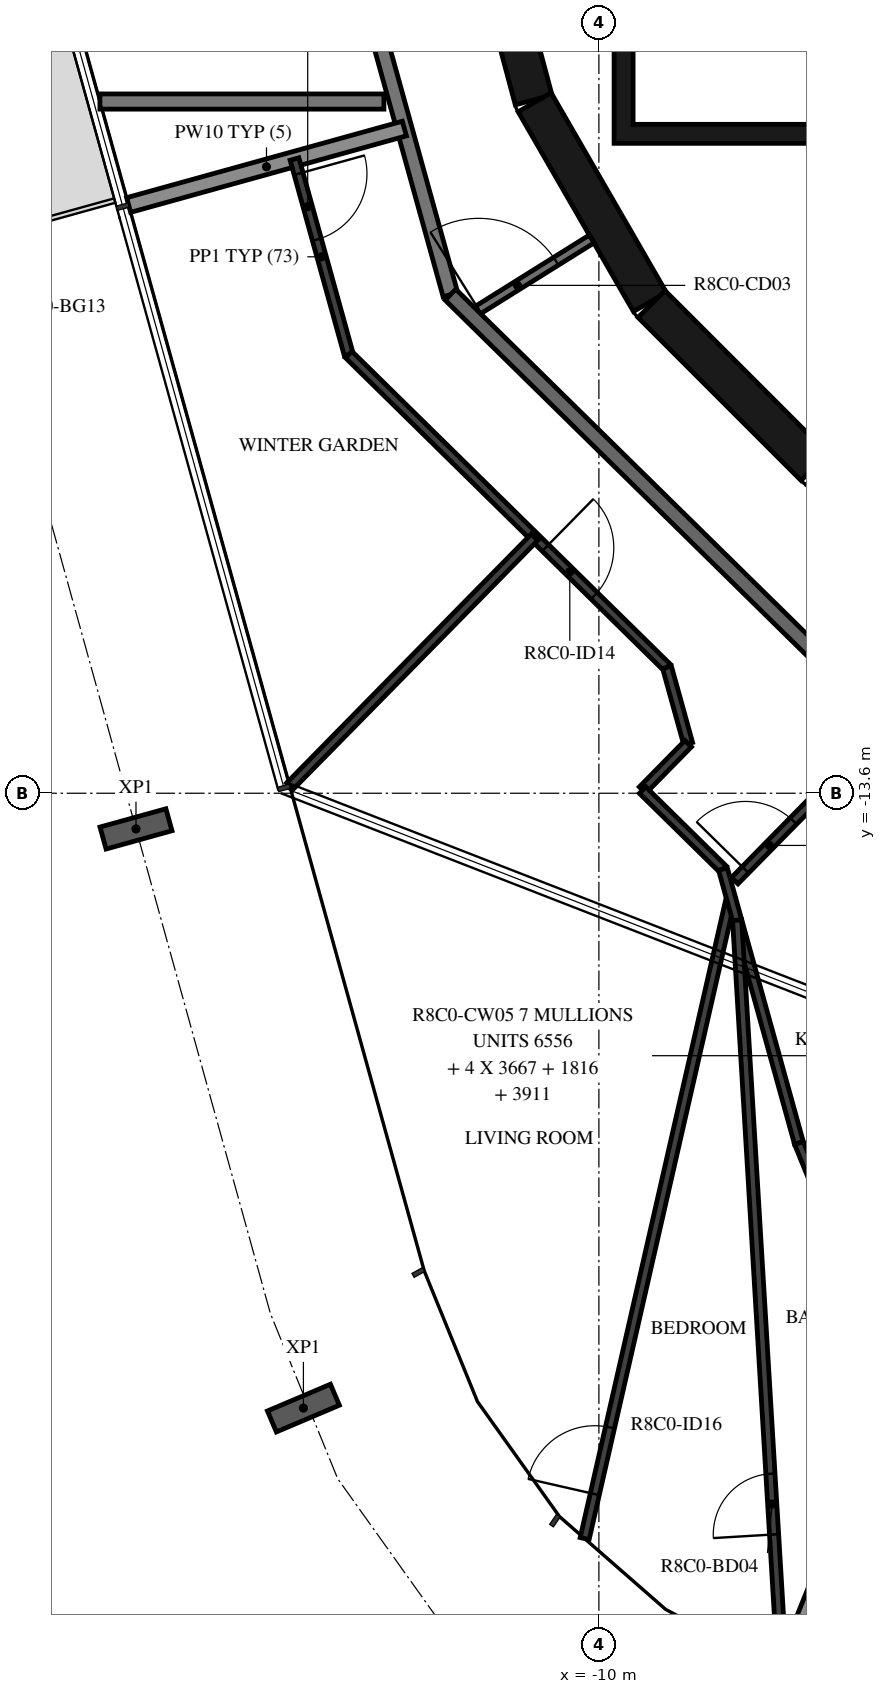
"""IFC4 building model, lengths in metres.
Left out: names, types, materials, properties, quantities, classifications, styles, units other than length and angle.
Written with IfcOpenShell. Run it as: python <this file> out.ifc"""

import sys

from ifc_helpers import new_model, si_unit, direction, frame, frame_2d, origin, origin_2d, place, context, subcontext, project, spatial, polyline, rectangle, i_section, outline, extrude, element, fill, save


model = new_model("IFC4")
c1 = context("Model", 3, precision=1e-05, world=origin(), true_north=direction((0.0, 1.0)))
c2 = subcontext(c1, "Body", "Model", "MODEL_VIEW")
j1 = project(units=[si_unit("LENGTHUNIT", "METRE"), si_unit("PLANEANGLEUNIT", "RADIAN")], contexts=[c1])
p1 = place(None, origin())
s1 = spatial("IfcSite", under=j1, at=p1, CompositionType="ELEMENT")
p2 = place(p1, origin())
s2 = spatial("IfcBuilding", under=s1, at=p2, CompositionType="ELEMENT")
p3 = place(p2, frame((0.0, 0.0, 319.2)))
s3 = spatial("IfcBuildingStorey", under=s2, at=p3, CompositionType="ELEMENT", Elevation=319.2)
for number, where, z_axis, x_axis in (
    (1, (-16.09, -14.069, -0.38), (0.0, 0.0, 1.0), (-0.267, 0.964, 0.0)),
    (2, (-13.887, -21.689, -0.38), (0.0, 0.0, 1.0), (-0.39, 0.921, 0.0)),
):
    element("IfcColumn", number, at=place(p3, frame(where, z_axis=z_axis, x_axis=x_axis)), inside=s3, PredefinedType="COLUMN", context=c2, shape_type="SweptSolid", body=[
        extrude(i_section(OverallWidth=0.3, OverallDepth=0.9, WebThickness=0.019, FlangeThickness=0.035, FilletRadius=0.03, at=origin_2d()), origin(), (0.0, 0.0, 1.0), 3.5),
    ])
p4 = place(p3, frame((-11.643, -1.55, 0.0), z_axis=(0.0, 0.0, 1.0), x_axis=(0.258734743916, -0.965948410781, 0.0)))
e3 = element("IfcWall", 3, at=p4, inside=s3, PredefinedType="SHEAR", context=c2, shape_type="SweptSolid", body=[
    extrude(rectangle(XDim=3.033, YDim=0.5, at=frame_2d((1.516, 0.0))), origin(), (0.0, 0.0, 1.0), 3.12),
])
p5 = place(p4, frame((1.066, 0.0, 0.0)))
e4 = element("IfcOpeningElement", 4, at=p5, cuts=e3, PredefinedType="OPENING", context=c2, shape_type="SweptSolid", body=[
    extrude(rectangle(XDim=0.9, YDim=2.1, at=frame_2d((0.45, 1.05))), frame((0.0, 0.26, 0.0), z_axis=(0.0, -1.0, 0.0), x_axis=(1.0, 0.0, 0.0)), (0.0, 0.0, 1.0), 0.52),
])
p6 = place(p3, frame((-10.845, -4.51, 0.0), z_axis=(0.0, 0.0, 1.0), x_axis=(0.500087131594, -0.865975092491, 0.0)))
e5 = element("IfcWall", 5, at=p6, inside=s3, PredefinedType="SHEAR", context=c2, shape_type="SweptSolid", body=[
    extrude(rectangle(XDim=3.033, YDim=0.5, at=frame_2d((1.516, 0.0))), origin(), (0.0, 0.0, 1.0), 3.12),
])
p7 = place(p3, frame((-9.308, -7.164, 0.0), z_axis=(0.0, 0.0, 1.0), x_axis=(0.707106781187, -0.707106781187, 0.0)))
e6 = element("IfcWall", 6, at=p7, inside=s3, PredefinedType="SHEAR", context=c2, shape_type="SweptSolid", body=[
    extrude(rectangle(XDim=3.032, YDim=0.5, at=frame_2d((1.516, 0.0))), origin(), (0.0, 0.0, 1.0), 3.12),
])
p8 = place(p3, origin())
e7 = element("IfcWall", 7, at=p8, inside=s3, PredefinedType="SHEAR", context=c2, shape_type="SweptSolid", body=[
    extrude(outline(polyline([(9.8, -5.05), (9.8, -4.8), (9.8, -1.9), (9.55, -1.9), (9.55, -4.8), (7.65, -4.8), (7.65, -1.9), (7.4, -1.9), (7.4, -4.8), (5.5, -4.8), (5.5, -1.9), (5.25, -1.9), (5.25, -4.8), (3.35, -4.8), (3.35, -1.9), (3.1, -1.9), (3.1, -4.8), (1.2, -4.8), (1.2, -1.9), (0.95, -1.9), (0.95, -4.8), (-0.95, -4.8), (-0.95, -1.9), (-1.2, -1.9), (-1.2, -4.8), (-3.1, -4.8), (-3.1, -1.9), (-3.35, -1.9), (-3.35, -4.8), (-5.25, -4.8), (-5.25, -1.9), (-5.5, -1.9), (-5.5, -4.8), (-9.55, -4.8), (-9.55, -1.9), (-9.8, -1.9), (-9.8, -4.8), (-9.8, -5.05), (9.8, -5.05)])), origin(), (0.0, 0.0, 1.0), 3.12),
])
p9 = place(p3, frame((-11.687, -7.303, 0.0), z_axis=(0.0, 0.0, 1.0), x_axis=(0.848064094072, 0.529893661357, 0.0)))
e8 = element("IfcWall", 8, at=p9, inside=s3, PredefinedType="PARTITIONING", context=c2, shape_type="SweptSolid", body=[
    extrude(rectangle(XDim=1.876, YDim=0.12, at=frame_2d((0.938, 0.0))), origin(), (0.0, 0.0, 1.0), 3.12),
])
p10 = place(p9, frame((0.125, 0.0, 0.0)))
e9 = element("IfcOpeningElement", 9, at=p10, cuts=e8, PredefinedType="OPENING", context=c2, shape_type="SweptSolid", body=[
    extrude(rectangle(XDim=1.2, YDim=2.1, at=frame_2d((0.6, 1.05))), frame((0.0, 0.07, 0.0), z_axis=(0.0, -1.0, 0.0), x_axis=(1.0, 0.0, 0.0)), (0.0, 0.0, 1.0), 0.14),
])
p11 = place(p3, frame((-13.872, -0.121, 0.0), z_axis=(0.0, 0.0, 1.0), x_axis=(0.267254575108, -0.963625960674, 0.0)))
e10 = element("IfcWall", 10, at=p11, inside=s3, PredefinedType="STANDARD", context=c2, shape_type="SweptSolid", body=[
    extrude(rectangle(XDim=7.181, YDim=0.2, at=frame_2d((3.591, 0.0))), origin(), (0.0, 0.0, 1.0), 3.12),
])
p12 = place(p3, frame((-11.953, -7.041, 0.0), z_axis=(0.0, 0.0, 1.0), x_axis=(0.713250549143, -0.70090916255, 0.0)))
e11 = element("IfcWall", 11, at=p12, inside=s3, PredefinedType="STANDARD", context=c2, shape_type="SweptSolid", body=[
    extrude(rectangle(XDim=7.181, YDim=0.2, at=frame_2d((3.59, 0.0))), origin(), (0.0, 0.0, 1.0), 3.12),
])
p13 = place(p3, frame((-16.564, -4.5, 0.0), z_axis=(0.0, 0.0, 1.0), x_axis=(1.0, 0.0, 0.0)))
e12 = element("IfcWall", 12, at=p13, inside=s3, PredefinedType="STANDARD", context=c2, shape_type="SweptSolid", body=[
    extrude(rectangle(XDim=3.736, YDim=0.2, at=frame_2d((1.868, 0.0))), origin(), (0.0, 0.0, 1.0), 3.12),
])
p14 = place(p3, frame((-16.187, -5.862, 0.0), z_axis=(0.0, 0.0, 1.0), x_axis=(0.963631166683, 0.267235803358, 0.0)))
e13 = element("IfcWall", 13, at=p14, inside=s3, PredefinedType="STANDARD", context=c2, shape_type="SweptSolid", body=[
    extrude(rectangle(XDim=3.765, YDim=0.2, at=frame_2d((1.882, 0.0))), origin(), (0.0, 0.0, 1.0), 2.73),
])
p15 = place(p3, frame((-7.582, -25.151, 0.0), z_axis=(0.0, 0.0, 1.0), x_axis=(0.374645287615, 0.927168220156, 0.0)))
e14 = element("IfcWall", 14, at=p15, inside=s3, PredefinedType="STANDARD", context=c2, shape_type="SweptSolid", body=[
    extrude(rectangle(XDim=6.423, YDim=0.2, at=frame_2d((3.212, 0.0))), origin(), (0.0, 0.0, 1.0), 2.73),
])
p16 = place(p3, frame((-14.005, -5.256, 0.0), z_axis=(0.0, 0.0, 1.0), x_axis=(0.267200500487, -0.963640956238, 0.0)))
e15 = element("IfcWall", 15, at=p16, inside=s3, PredefinedType="PARTITIONING", context=c2, shape_type="SweptSolid", body=[
    extrude(rectangle(XDim=2.67, YDim=0.12, at=frame_2d((1.335, 0.0))), origin(), (0.0, 0.0, 1.0), 3.12),
])
p17 = place(p16, frame((0.2, 0.0, 0.0)))
e16 = element("IfcOpeningElement", 16, at=p17, cuts=e15, PredefinedType="OPENING", context=c2, shape_type="SweptSolid", body=[
    extrude(rectangle(XDim=0.9, YDim=2.1, at=frame_2d((0.45, 1.05))), frame((0.0, 0.07, 0.0), z_axis=(0.0, -1.0, 0.0), x_axis=(1.0, 0.0, 0.0)), (0.0, 0.0, 1.0), 0.14),
])
p18 = place(p3, frame((-13.291, -7.829, 0.0), z_axis=(0.0, 0.0, 1.0), x_axis=(0.713255094589, -0.700904537039, 0.0)))
e17 = element("IfcWall", 17, at=p18, inside=s3, PredefinedType="PARTITIONING", context=c2, shape_type="SweptSolid", body=[
    extrude(rectangle(XDim=5.871, YDim=0.12, at=frame_2d((2.936, 0.0))), origin(), (0.0, 0.0, 1.0), 3.12),
])
p19 = place(p18, frame((3.627, 0.0, 0.0)))
e18 = element("IfcOpeningElement", 18, at=p19, cuts=e17, PredefinedType="OPENING", context=c2, shape_type="SweptSolid", body=[
    extrude(rectangle(XDim=0.9, YDim=2.1, at=frame_2d((0.45, 1.05))), frame((0.0, 0.07, 0.0), z_axis=(0.0, -1.0, 0.0), x_axis=(1.0, 0.0, 0.0)), (0.0, 0.0, 1.0), 0.14),
])
p20 = place(p3, frame((-9.104, -11.944, 0.0), z_axis=(0.0, 0.0, 1.0), x_axis=(0.267317596771, -0.963608479859, 0.0)))
e19 = element("IfcWall", 19, at=p20, inside=s3, PredefinedType="PARTITIONING", context=c2, shape_type="SweptSolid", body=[
    extrude(rectangle(XDim=1.042, YDim=0.12, at=frame_2d((0.521, 0.0))), origin(), (0.0, 0.0, 1.0), 3.12),
])
p21 = place(p3, frame((-8.825, -12.948, 0.0), z_axis=(0.0, 0.0, 1.0), x_axis=(-0.700949034431, -0.713211364976, 0.0)))
e20 = element("IfcWall", 20, at=p21, inside=s3, PredefinedType="PARTITIONING", context=c2, shape_type="SweptSolid", body=[
    extrude(rectangle(XDim=0.856, YDim=0.12, at=frame_2d((0.428, 0.0))), origin(), (0.0, 0.0, 1.0), 3.12),
])
p22 = place(p3, frame((-9.425, -13.559, 0.0), z_axis=(0.0, 0.0, 1.0), x_axis=(0.713255540994, -0.700904082768, 0.0)))
e21 = element("IfcWall", 21, at=p22, inside=s3, PredefinedType="PARTITIONING", context=c2, shape_type="SweptSolid", body=[
    extrude(rectangle(XDim=1.482, YDim=0.12, at=frame_2d((0.741, 0.0))), origin(), (0.0, 0.0, 1.0), 3.12),
])
p23 = place(p3, frame((-8.213, -14.75, 0.0), z_axis=(0.0, 0.0, 1.0), x_axis=(0.700899260151, 0.713260280066, 0.0)))
e22 = element("IfcWall", 22, at=p23, inside=s3, PredefinedType="PARTITIONING", context=c2, shape_type="SweptSolid", body=[
    extrude(rectangle(XDim=1.659, YDim=0.12, at=frame_2d((0.83, 0.0))), origin(), (0.0, 0.0, 1.0), 3.12),
])
p24 = place(p23, frame((0.2, 0.0, 0.0)))
e23 = element("IfcOpeningElement", 23, at=p24, cuts=e22, PredefinedType="OPENING", context=c2, shape_type="SweptSolid", body=[
    extrude(rectangle(XDim=0.9, YDim=2.1, at=frame_2d((0.45, 1.05))), frame((0.0, 0.07, 0.0), z_axis=(0.0, -1.0, 0.0), x_axis=(1.0, 0.0, 0.0)), (0.0, 0.0, 1.0), 0.14),
])
p25 = place(p3, frame((-14.066, -13.508, 0.0), z_axis=(0.0, 0.0, 1.0), x_axis=(0.700941781432, 0.7132184932, 0.0)))
e24 = element("IfcWall", 24, at=p25, inside=s3, PredefinedType="PARTITIONING", context=c2, shape_type="SweptSolid", body=[
    extrude(rectangle(XDim=4.594, YDim=0.12, at=frame_2d((2.297, 0.0))), origin(), (0.0, 0.0, 1.0), 3.12),
])
p26 = place(p3, frame((-10.187, -23.406, 0.0), z_axis=(0.0, 0.0, 1.0), x_axis=(0.222411648081, 0.974952849526, 0.0)))
e25 = element("IfcWall", 25, at=p26, inside=s3, PredefinedType="PARTITIONING", context=c2, shape_type="SweptSolid", body=[
    extrude(rectangle(XDim=8.649, YDim=0.12, at=frame_2d((4.324, 0.0))), origin(), (0.0, 0.0, 1.0), 3.12),
])
p27 = place(p26, frame((0.6, 0.0, 0.0)))
e26 = element("IfcOpeningElement", 26, at=p27, cuts=e25, PredefinedType="OPENING", context=c2, shape_type="SweptSolid", body=[
    extrude(rectangle(XDim=0.9, YDim=2.1, at=frame_2d((0.45, 1.05))), frame((0.0, 0.07, 0.0), z_axis=(0.0, -1.0, 0.0), x_axis=(1.0, 0.0, 0.0)), (0.0, 0.0, 1.0), 0.14),
])
p28 = place(p3, frame((-7.368, -18.202, 0.0), z_axis=(0.0, 0.0, 1.0), x_axis=(-0.267246564077, 0.963628182438, 0.0)))
e27 = element("IfcWall", 27, at=p28, inside=s3, PredefinedType="PARTITIONING", context=c2, shape_type="SweptSolid", body=[
    extrude(rectangle(XDim=3.74, YDim=0.12, at=frame_2d((1.87, 0.0))), origin(), (0.0, 0.0, 1.0), 3.12),
])
p29 = place(p3, frame((-7.587, -25.148, 0.0), z_axis=(0.0, 0.0, 1.0), x_axis=(-0.060023558623, 0.99819696073, 0.0)))
e28 = element("IfcWall", 28, at=p29, inside=s3, PredefinedType="PARTITIONING", context=c2, shape_type="SweptSolid", body=[
    extrude(rectangle(XDim=9.896, YDim=0.12, at=frame_2d((4.948, 0.0))), origin(), (0.0, 0.0, 1.0), 3.12),
])
p30 = place(p29, frame((1.8, 0.0, 0.0)))
e29 = element("IfcOpeningElement", 29, at=p30, cuts=e28, PredefinedType="OPENING", context=c2, shape_type="SweptSolid", body=[
    extrude(rectangle(XDim=0.8, YDim=2.1, at=frame_2d((0.4, 1.05))), frame((0.0, 0.07, 0.0), z_axis=(0.0, -1.0, 0.0), x_axis=(1.0, 0.0, 0.0)), (0.0, 0.0, 1.0), 0.14),
])
p31 = place(p3, frame((-7.368, -18.202, 0.0), z_axis=(0.0, 0.0, 1.0), x_axis=(0.377296887314, -0.92609235977, 0.0)))
e30 = element("IfcWall", 30, at=p31, inside=s3, PredefinedType="PARTITIONING", context=c2, shape_type="SweptSolid", body=[
    extrude(rectangle(XDim=0.947, YDim=0.12, at=frame_2d((0.473, 0.0))), origin(), (0.0, 0.0, 1.0), 3.12),
])
p32 = place(p17, origin())
e31 = element("IfcDoor", 31, at=p32, inside=s3, OperationType="SINGLE_SWING_RIGHT", PredefinedType="DOOR", context=c2, shape_type="SweptSolid", body=[
    extrude(rectangle(XDim=0.9, YDim=2.1, at=frame_2d((0.45, 1.05))), frame((0.0, 0.025, 0.0), z_axis=(0.0, -1.0, 0.0), x_axis=(1.0, 0.0, 0.0)), (0.0, 0.0, 1.0), 0.05),
])
fill(e16, e31)
p33 = place(p19, origin())
e32 = element("IfcDoor", 32, at=p33, inside=s3, OperationType="SINGLE_SWING_RIGHT", PredefinedType="DOOR", context=c2, shape_type="SweptSolid", body=[
    extrude(rectangle(XDim=0.9, YDim=2.1, at=frame_2d((0.45, 1.05))), frame((0.0, 0.025, 0.0), z_axis=(0.0, -1.0, 0.0), x_axis=(1.0, 0.0, 0.0)), (0.0, 0.0, 1.0), 0.05),
])
fill(e18, e32)
p34 = place(p24, origin())
e33 = element("IfcDoor", 33, at=p34, inside=s3, OperationType="SINGLE_SWING_LEFT", PredefinedType="DOOR", context=c2, shape_type="SweptSolid", body=[
    extrude(rectangle(XDim=0.9, YDim=2.1, at=frame_2d((0.45, 1.05))), frame((0.0, 0.025, 0.0), z_axis=(0.0, -1.0, 0.0), x_axis=(1.0, 0.0, 0.0)), (0.0, 0.0, 1.0), 0.05),
])
fill(e23, e33)
p35 = place(p27, origin())
e34 = element("IfcDoor", 34, at=p35, inside=s3, OperationType="SINGLE_SWING_RIGHT", PredefinedType="DOOR", context=c2, shape_type="SweptSolid", body=[
    extrude(rectangle(XDim=0.9, YDim=2.1, at=frame_2d((0.45, 1.05))), frame((0.0, 0.025, 0.0), z_axis=(0.0, -1.0, 0.0), x_axis=(1.0, 0.0, 0.0)), (0.0, 0.0, 1.0), 0.05),
])
fill(e26, e34)
p36 = place(p30, origin())
e35 = element("IfcDoor", 35, at=p36, inside=s3, OperationType="SINGLE_SWING_RIGHT", PredefinedType="DOOR", context=c2, shape_type="SweptSolid", body=[
    extrude(rectangle(XDim=0.8, YDim=2.1, at=frame_2d((0.4, 1.05))), frame((0.0, 0.025, 0.0), z_axis=(0.0, -1.0, 0.0), x_axis=(1.0, 0.0, 0.0)), (0.0, 0.0, 1.0), 0.05),
])
fill(e29, e35)
p37 = place(p10, origin())
e36 = element("IfcDoor", 36, at=p37, inside=s3, OperationType="DOUBLE_DOOR_SINGLE_SWING", PredefinedType="DOOR", context=c2, shape_type="SweptSolid", body=[
    extrude(rectangle(XDim=1.2, YDim=2.1, at=frame_2d((0.6, 1.05))), frame((0.0, 0.025, 0.0), z_axis=(0.0, -1.0, 0.0), x_axis=(1.0, 0.0, 0.0)), (0.0, 0.0, 1.0), 0.05),
])
fill(e9, e36)
save(model, sys.argv[1])
